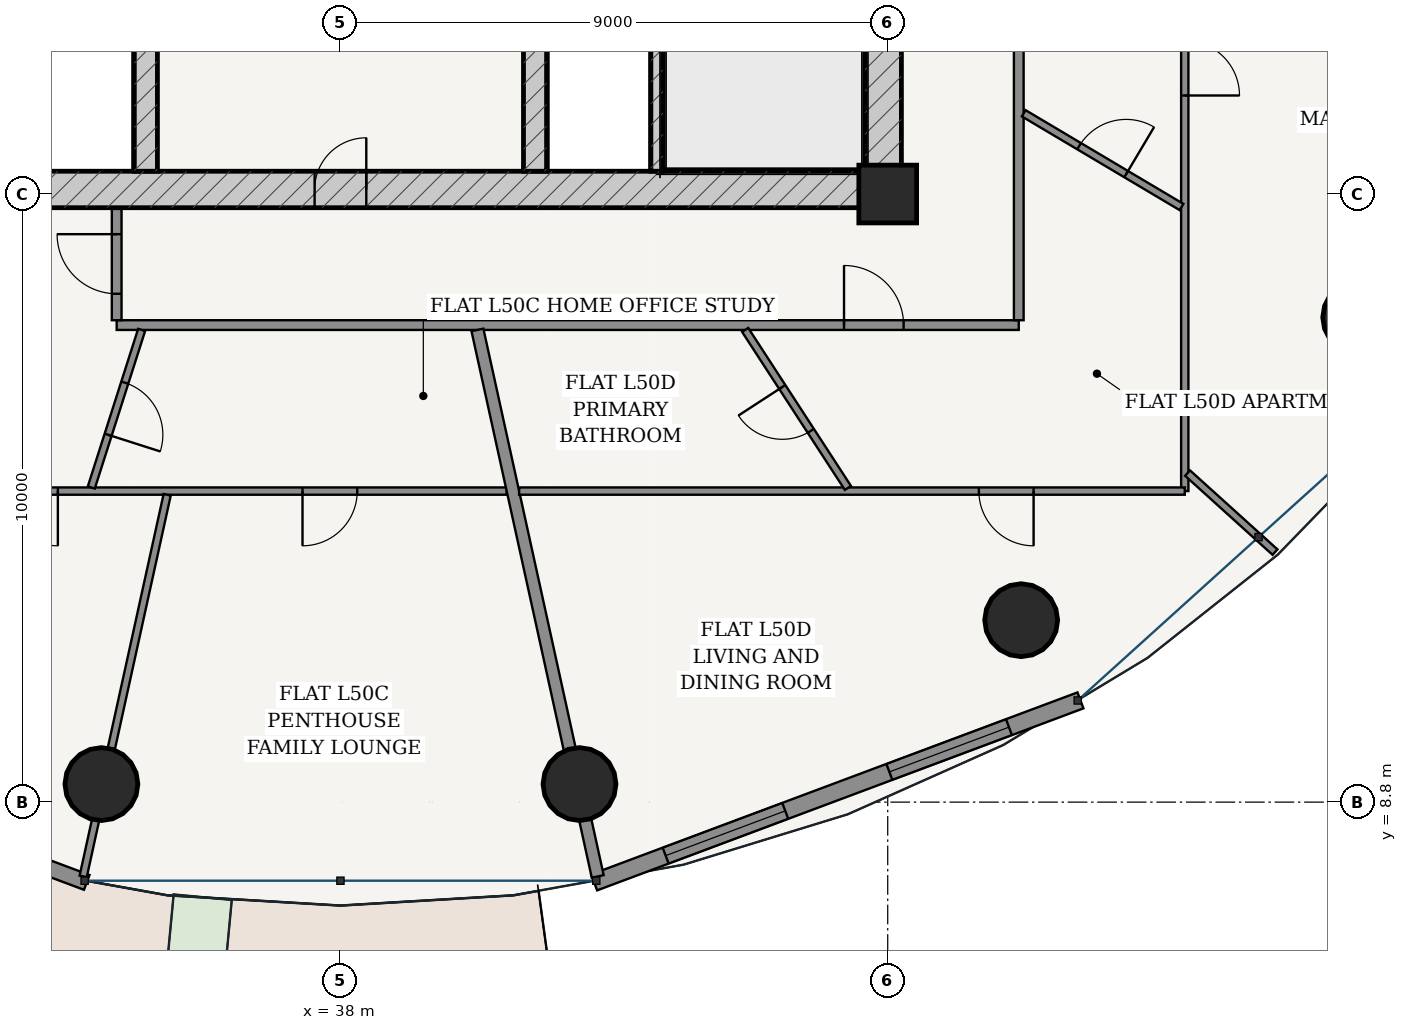
"""IFC4 building model, lengths in metres.
Left out: names, types, materials, properties, quantities, classifications, styles, units other than length and angle.
Written with IfcOpenShell. Run it as: python <this file> out.ifc"""

import sys

from ifc_helpers import new_model, si_unit, direction, frame, frame_2d, origin, origin_2d, place, context, subcontext, project, spatial, rectangle, hollow_circle, extrude, source, transform, mapped, element, fill, save


model = new_model("IFC4")
c1 = context("Model", 3, precision=1e-05, world=origin(), true_north=direction((-0.2419218956, 0.970295726276)))
c2 = subcontext(c1, "Body", "Model", "MODEL_VIEW")
j1 = project(units=[si_unit("LENGTHUNIT", "METRE"), si_unit("PLANEANGLEUNIT", "RADIAN")], contexts=[c1])
p1 = place(None, origin())
s1 = spatial("IfcSite", under=j1, at=p1, CompositionType="ELEMENT")
p2 = place(p1, origin())
s2 = spatial("IfcBuilding", under=s1, at=p2, CompositionType="ELEMENT")
p3 = place(p2, frame((0.0, 0.0, 191.2)))
s3 = spatial("IfcBuildingStorey", under=s2, at=p3, CompositionType="ELEMENT", Elevation=191.2)
p4 = place(p3, frame((47.0, 18.8, 0.0), z_axis=(0.0, 0.0, 1.0), x_axis=(1.0, 0.0, 0.0)))
e1 = element("IfcColumn", 1, at=p4, inside=s3, PredefinedType="COLUMN", context=c2, shape_type="SweptSolid", body=[
    extrude(rectangle(XDim=0.95, YDim=0.95, at=origin_2d()), origin(), (0.0, 0.0, 1.0), 3.7),
])
p5 = place(p3, frame((28.775, 18.875, 0.0), z_axis=(0.0, 0.0, 1.0), x_axis=(1.0, 0.0, 0.0)))
e2 = element("IfcWall", 2, at=p5, inside=s3, PredefinedType="SHEAR", context=c2, shape_type="SweptSolid", body=[
    extrude(rectangle(XDim=18.45, YDim=0.6, at=frame_2d((9.225, 0.0))), origin(), (0.0, 0.0, 1.0), 3.435),
])
p6 = place(p5, frame((8.8, 0.0, 0.0)))
e3 = element("IfcOpeningElement", 3, at=p6, cuts=e2, PredefinedType="OPENING", context=c2, shape_type="SweptSolid", body=[
    extrude(rectangle(XDim=0.85, YDim=2.1, at=frame_2d((0.425, 1.05))), frame((0.0, 0.31, 0.0), z_axis=(0.0, -1.0, 0.0), x_axis=(1.0, 0.0, 0.0)), (0.0, 0.0, 1.0), 0.62),
])
p7 = place(p3, frame((46.925, 19.175, 0.0), z_axis=(0.0, 0.0, 1.0), x_axis=(0.0, 1.0, 0.0)))
e4 = element("IfcWall", 4, at=p7, inside=s3, PredefinedType="SHEAR", context=c2, shape_type="SweptSolid", body=[
    extrude(rectangle(XDim=15.25, YDim=0.6, at=frame_2d((7.625, 0.0))), origin(), (0.0, 0.0, 1.0), 3.435),
])
p8 = place(p7, frame((9.875, 0.0, 0.0)))
e5 = element("IfcOpeningElement", 5, at=p8, cuts=e4, PredefinedType="OPENING", context=c2, shape_type="SweptSolid", body=[
    extrude(rectangle(XDim=1.5, YDim=2.2, at=frame_2d((0.75, 1.1))), frame((0.0, 0.31, 0.0), z_axis=(0.0, -1.0, 0.0), x_axis=(1.0, 0.0, 0.0)), (0.0, 0.0, 1.0), 0.62),
])
p9 = place(p3, frame((43.205, 19.175, 0.0), z_axis=(0.0, 0.0, 1.0), x_axis=(0.0, 1.0, 0.0)))
e6 = element("IfcWall", 6, at=p9, inside=s3, PredefinedType="SOLIDWALL", context=c2, shape_type="SweptSolid", body=[
    extrude(rectangle(XDim=7.375, YDim=0.2, at=frame_2d((3.688, 0.0))), origin(), (0.0, 0.0, 1.0), 3.435),
])
p10 = place(p3, frame((34.8, 19.175, 0.0), z_axis=(0.0, 0.0, 1.0), x_axis=(0.0, 1.0, 0.0)))
e7 = element("IfcWall", 7, at=p10, inside=s3, PredefinedType="SHEAR", context=c2, shape_type="SweptSolid", body=[
    extrude(rectangle(XDim=15.25, YDim=0.38, at=frame_2d((7.625, 0.0))), origin(), (0.0, 0.0, 1.0), 3.435),
])
p11 = place(p10, frame((7.8, 0.0, 0.0)))
e8 = element("IfcOpeningElement", 8, at=p11, cuts=e7, PredefinedType="OPENING", context=c2, shape_type="SweptSolid", body=[
    extrude(rectangle(XDim=1.05, YDim=2.15, at=frame_2d((0.525, 1.075))), frame((0.0, 0.2, 0.0), z_axis=(0.0, -1.0, 0.0), x_axis=(1.0, 0.0, 0.0)), (0.0, 0.0, 1.0), 0.4),
])
p12 = place(p3, frame((41.2, 19.175, 0.0), z_axis=(0.0, 0.0, 1.0), x_axis=(0.0, 1.0, 0.0)))
e9 = element("IfcWall", 9, at=p12, inside=s3, PredefinedType="SHEAR", context=c2, shape_type="SweptSolid", body=[
    extrude(rectangle(XDim=15.25, YDim=0.38, at=frame_2d((7.625, 0.0))), origin(), (0.0, 0.0, 1.0), 3.435),
])
p13 = place(p12, frame((7.8, 0.0, 0.0)))
e10 = element("IfcOpeningElement", 10, at=p13, cuts=e9, PredefinedType="OPENING", context=c2, shape_type="SweptSolid", body=[
    extrude(rectangle(XDim=1.05, YDim=2.15, at=frame_2d((0.525, 1.075))), frame((0.0, 0.2, 0.0), z_axis=(0.0, -1.0, 0.0), x_axis=(1.0, 0.0, 0.0)), (0.0, 0.0, 1.0), 0.4),
])
for number, where, z_axis, x_axis in (
    (11, (34.069, 9.097, 0.0), (0.0, 0.0, 1.0), (1.0, 0.0, 0.0)),
    (12, (41.931, 9.097, 0.0), (0.0, 0.0, 1.0), (1.0, 0.0, 0.0)),
    (13, (49.195, 11.792, 0.0), (0.0, 0.0, 1.0), (1.0, 0.0, 0.0)),
    (14, (54.754, 16.772, 0.0), (0.0, 0.0, 1.0), (1.0, 0.0, 0.0)),
):
    element("IfcColumn", number, at=place(p3, frame(where, z_axis=z_axis, x_axis=x_axis)), inside=s3, PredefinedType="COLUMN", context=c2, shape_type="SweptSolid", body=[
        extrude(hollow_circle(Radius=0.6, WallThickness=0.038, at=origin_2d()), origin(), (0.0, 0.0, 1.0), 3.7),
    ])
p14 = place(p3, frame((25.83, 10.473, 0.0), z_axis=(0.0, 0.0, 1.0), x_axis=(0.936556918375, -0.350515532672, 0.0)))
e15 = element("IfcWall", 15, at=p14, inside=s3, PredefinedType="SOLIDWALL", context=c2, shape_type="SweptSolid", body=[
    extrude(rectangle(XDim=8.539, YDim=0.26, at=frame_2d((4.27, 0.0))), origin(), (0.0, 0.0, 1.0), 3.435),
])
p15 = place(p14, frame((3.594, 0.0, 0.0)))
e16 = element("IfcOpeningElement", 16, at=p15, cuts=e15, PredefinedType="OPENING", context=c2, shape_type="SweptSolid", body=[
    extrude(rectangle(XDim=1.35, YDim=2.2, at=frame_2d((0.675, 1.1))), frame((0.0, 0.14, 0.0), z_axis=(0.0, -1.0, 0.0), x_axis=(1.0, 0.0, 0.0)), (0.0, 0.0, 1.0), 0.28),
])
p16 = place(p3, frame((42.172, 7.48, 0.0), z_axis=(0.0, 0.0, 1.0), x_axis=(0.936556918375, 0.350515532672, 0.0)))
e17 = element("IfcWall", 17, at=p16, inside=s3, PredefinedType="SOLIDWALL", context=c2, shape_type="SweptSolid", body=[
    extrude(rectangle(XDim=8.539, YDim=0.28, at=frame_2d((4.27, 0.0))), origin(), (0.0, 0.0, 1.0), 3.435),
])
p17 = place(p16, frame((1.256, 0.0, 0.85)))
e18 = element("IfcOpeningElement", 18, at=p17, cuts=e17, PredefinedType="OPENING", context=c2, shape_type="SweptSolid", body=[
    extrude(rectangle(XDim=2.1, YDim=1.95, at=frame_2d((1.05, 0.975))), frame((0.0, 0.15, 0.0), z_axis=(0.0, -1.0, 0.0), x_axis=(1.0, 0.0, 0.0)), (0.0, 0.0, 1.0), 0.3),
])
p18 = place(p16, frame((5.184, 0.0, 0.85)))
e19 = element("IfcOpeningElement", 19, at=p18, cuts=e17, PredefinedType="OPENING", context=c2, shape_type="SweptSolid", body=[
    extrude(rectangle(XDim=2.1, YDim=1.95, at=frame_2d((1.05, 0.975))), frame((0.0, 0.15, 0.0), z_axis=(0.0, -1.0, 0.0), x_axis=(1.0, 0.0, 0.0)), (0.0, 0.0, 1.0), 0.3),
])
p19 = place(p3, frame((34.32, 16.645, 0.0), z_axis=(0.0, 0.0, 1.0), x_axis=(1.0, 0.0, 0.0)))
e20 = element("IfcWall", 20, at=p19, inside=s3, PredefinedType="PARTITIONING", context=c2, shape_type="SweptSolid", body=[
    extrude(rectangle(XDim=14.835, YDim=0.16, at=frame_2d((7.417, 0.0))), origin(), (0.0, 0.0, 1.0), 2.951),
])
p20 = place(p19, frame((11.961, 0.0, 0.0)))
e21 = element("IfcOpeningElement", 21, at=p20, cuts=e20, PredefinedType="OPENING", context=c2, shape_type="SweptSolid", body=[
    extrude(rectangle(XDim=0.98, YDim=2.2, at=frame_2d((0.49, 1.1))), frame((0.0, 0.09, 0.0), z_axis=(0.0, -1.0, 0.0), x_axis=(1.0, 0.0, 0.0)), (0.0, 0.0, 1.0), 0.18),
])
p21 = place(p3, frame((34.32, 16.725, 0.0), z_axis=(0.0, 0.0, 1.0), x_axis=(0.0, 1.0, 0.0)))
e22 = element("IfcWall", 22, at=p21, inside=s3, PredefinedType="PARTITIONING", context=c2, shape_type="SweptSolid", body=[
    extrude(rectangle(XDim=1.85, YDim=0.16, at=frame_2d((0.925, 0.0))), origin(), (0.0, 0.0, 1.0), 3.435),
])
p22 = place(p21, frame((0.435, 0.0, 0.0)))
e23 = element("IfcOpeningElement", 23, at=p22, cuts=e22, PredefinedType="OPENING", context=c2, shape_type="SweptSolid", body=[
    extrude(rectangle(XDim=0.98, YDim=2.2, at=frame_2d((0.49, 1.1))), frame((0.0, 0.09, 0.0), z_axis=(0.0, -1.0, 0.0), x_axis=(1.0, 0.0, 0.0)), (0.0, 0.0, 1.0), 0.18),
])
p23 = place(p3, frame((49.155, 16.725, 0.0), z_axis=(0.0, 0.0, 1.0), x_axis=(0.0, 1.0, 0.0)))
e24 = element("IfcWall", 24, at=p23, inside=s3, PredefinedType="PARTITIONING", context=c2, shape_type="SweptSolid", body=[
    extrude(rectangle(XDim=18.3, YDim=0.16, at=frame_2d((9.15, 0.0))), origin(), (0.0, 0.0, 1.0), 2.951),
])
p24 = place(p3, frame((40.734, 13.915, 0.0), z_axis=(0.0, 0.0, 1.0), x_axis=(-1.0, 0.0, 0.0)))
e25 = element("IfcWall", 25, at=p24, inside=s3, PredefinedType="PARTITIONING", context=c2, shape_type="SweptSolid", body=[
    extrude(rectangle(XDim=9.144, YDim=0.12, at=frame_2d((4.572, 0.0))), origin(), (0.0, 0.0, 1.0), 2.951),
])
p25 = place(p24, frame((7.381, 0.0, 0.0)))
e26 = element("IfcOpeningElement", 26, at=p25, cuts=e25, PredefinedType="OPENING", context=c2, shape_type="SweptSolid", body=[
    extrude(rectangle(XDim=0.9, YDim=2.15, at=frame_2d((0.45, 1.075))), frame((0.0, 0.07, 0.0), z_axis=(0.0, -1.0, 0.0), x_axis=(1.0, 0.0, 0.0)), (0.0, 0.0, 1.0), 0.14),
])
p26 = place(p24, frame((2.458, 0.0, 0.0)))
e27 = element("IfcOpeningElement", 27, at=p26, cuts=e25, PredefinedType="OPENING", context=c2, shape_type="SweptSolid", body=[
    extrude(rectangle(XDim=0.9, YDim=2.15, at=frame_2d((0.45, 1.075))), frame((0.0, 0.07, 0.0), z_axis=(0.0, -1.0, 0.0), x_axis=(1.0, 0.0, 0.0)), (0.0, 0.0, 1.0), 0.14),
])
p27 = place(p3, frame((35.15, 13.854, 0.0), z_axis=(0.0, 0.0, 1.0), x_axis=(-0.214942949264, -0.976626606519, 0.0)))
e28 = element("IfcWall", 28, at=p27, inside=s3, PredefinedType="PARTITIONING", context=c2, shape_type="SweptSolid", body=[
    extrude(rectangle(XDim=6.427, YDim=0.12, at=frame_2d((3.213, 0.0))), origin(), (0.0, 0.0, 1.0), 2.951),
])
p28 = place(p3, frame((34.73, 16.565, 0.0), z_axis=(0.0, 0.0, 1.0), x_axis=(-0.304300161081, -0.952576197459, 0.0)))
e29 = element("IfcWall", 29, at=p28, inside=s3, PredefinedType="PARTITIONING", context=c2, shape_type="SweptSolid", body=[
    extrude(rectangle(XDim=2.72, YDim=0.12, at=frame_2d((1.36, 0.0))), origin(), (0.0, 0.0, 1.0), 3.11),
])
p29 = place(p28, frame((0.91, 0.0, 0.0)))
e30 = element("IfcOpeningElement", 30, at=p29, cuts=e29, PredefinedType="OPENING", context=c2, shape_type="SweptSolid", body=[
    extrude(rectangle(XDim=0.9, YDim=2.15, at=frame_2d((0.45, 1.075))), frame((0.0, 0.07, 0.0), z_axis=(0.0, -1.0, 0.0), x_axis=(1.0, 0.0, 0.0)), (0.0, 0.0, 1.0), 0.14),
])
p30 = place(p3, frame((40.253, 16.565, 0.0), z_axis=(0.0, 0.0, 1.0), x_axis=(0.214957946814, -0.976623305631, 0.0)))
e31 = element("IfcWall", 31, at=p30, inside=s3, PredefinedType="PARTITIONING", context=c2, shape_type="SweptSolid", body=[
    extrude(rectangle(XDim=9.202, YDim=0.2, at=frame_2d((4.601, 0.0))), origin(), (0.0, 0.0, 1.0), 2.951),
])
p31 = place(p3, frame((51.885, 29.194, 0.0), z_axis=(0.0, 0.0, 1.0), x_axis=(0.0, -1.0, 0.0)))
e32 = element("IfcWall", 32, at=p31, inside=s3, PredefinedType="PARTITIONING", context=c2, shape_type="SweptSolid", body=[
    extrude(rectangle(XDim=15.279, YDim=0.12, at=frame_2d((7.639, 0.0))), origin(), (0.0, 0.0, 1.0), 2.951),
])
p32 = place(p31, frame((7.873, 0.0, 0.0)))
e33 = element("IfcOpeningElement", 33, at=p32, cuts=e32, PredefinedType="OPENING", context=c2, shape_type="SweptSolid", body=[
    extrude(rectangle(XDim=0.9, YDim=2.15, at=frame_2d((0.45, 1.075))), frame((0.0, 0.07, 0.0), z_axis=(0.0, -1.0, 0.0), x_axis=(1.0, 0.0, 0.0)), (0.0, 0.0, 1.0), 0.14),
])
p33 = place(p3, frame((51.885, 13.915, 0.0), z_axis=(0.0, 0.0, 1.0), x_axis=(-1.0, 0.0, 0.0)))
e34 = element("IfcWall", 34, at=p33, inside=s3, PredefinedType="PARTITIONING", context=c2, shape_type="SweptSolid", body=[
    extrude(rectangle(XDim=10.947, YDim=0.12, at=frame_2d((5.473, 0.0))), origin(), (0.0, 0.0, 1.0), 2.951),
])
p34 = place(p33, frame((2.486, 0.0, 0.0)))
e35 = element("IfcOpeningElement", 35, at=p34, cuts=e34, PredefinedType="OPENING", context=c2, shape_type="SweptSolid", body=[
    extrude(rectangle(XDim=0.9, YDim=2.15, at=frame_2d((0.45, 1.075))), frame((0.0, 0.07, 0.0), z_axis=(0.0, -1.0, 0.0), x_axis=(1.0, 0.0, 0.0)), (0.0, 0.0, 1.0), 0.14),
])
p35 = place(p3, frame((51.931, 14.211, 0.0), z_axis=(0.0, 0.0, 1.0), x_axis=(0.741971265209, -0.670431683026, 0.0)))
e36 = element("IfcWall", 36, at=p35, inside=s3, PredefinedType="PARTITIONING", context=c2, shape_type="SweptSolid", body=[
    extrude(rectangle(XDim=1.938, YDim=0.12, at=frame_2d((0.969, 0.0))), origin(), (0.0, 0.0, 1.0), 2.951),
])
p36 = place(p3, frame((44.656, 16.565, 0.0), z_axis=(0.0, 0.0, 1.0), x_axis=(0.545173870382, -0.838322999239, 0.0)))
e37 = element("IfcWall", 37, at=p36, inside=s3, PredefinedType="PARTITIONING", context=c2, shape_type="SweptSolid", body=[
    extrude(rectangle(XDim=3.099, YDim=0.12, at=frame_2d((1.549, 0.0))), origin(), (0.0, 0.0, 1.0), 3.11),
])
p37 = place(p36, frame((1.119, 0.0, 0.0)))
e38 = element("IfcOpeningElement", 38, at=p37, cuts=e37, PredefinedType="OPENING", context=c2, shape_type="SweptSolid", body=[
    extrude(rectangle(XDim=0.86, YDim=2.15, at=frame_2d((0.43, 1.075))), frame((0.0, 0.07, 0.0), z_axis=(0.0, -1.0, 0.0), x_axis=(1.0, 0.0, 0.0)), (0.0, 0.0, 1.0), 0.14),
])
p38 = place(p3, frame((49.237, 20.128, 0.0), z_axis=(0.0, 0.0, 1.0), x_axis=(0.859818120481, -0.510600430565, 0.0)))
e39 = element("IfcWall", 39, at=p38, inside=s3, PredefinedType="PARTITIONING", context=c2, shape_type="SweptSolid", body=[
    extrude(rectangle(XDim=3.018, YDim=0.12, at=frame_2d((1.509, 0.0))), origin(), (0.0, 0.0, 1.0), 2.951),
])
p39 = place(p38, frame((1.059, 0.0, 0.0)))
e40 = element("IfcOpeningElement", 40, at=p39, cuts=e39, PredefinedType="OPENING", context=c2, shape_type="SweptSolid", body=[
    extrude(rectangle(XDim=0.9, YDim=2.15, at=frame_2d((0.45, 1.075))), frame((0.0, 0.07, 0.0), z_axis=(0.0, -1.0, 0.0), x_axis=(1.0, 0.0, 0.0)), (0.0, 0.0, 1.0), 0.14),
])
m1 = source(origin(), c2, "Body", "SweptSolid", [
    extrude(rectangle(XDim=2.1, YDim=1.95, at=frame_2d((1.05, 0.975))), frame((0.0, 0.03, 0.0), z_axis=(0.0, -1.0, 0.0), x_axis=(1.0, 0.0, 0.0)), (0.0, 0.0, 1.0), 0.06),
])
p40 = place(p17, origin())
e41 = element("IfcWindow", 41, at=p40, inside=s3, PartitioningType="SINGLE_PANEL", PredefinedType="WINDOW", context=c2, shape_type="MappedRepresentation", body=[
    mapped(m1, transform((0.0, 0.0, 0.0), scale=1.0)),
])
fill(e18, e41)
p41 = place(p18, origin())
e42 = element("IfcWindow", 42, at=p41, inside=s3, PartitioningType="SINGLE_PANEL", PredefinedType="WINDOW", context=c2, shape_type="MappedRepresentation", body=[
    mapped(m1, transform((0.0, 0.0, 0.0), scale=1.0)),
])
fill(e19, e42)
m2 = source(origin(), c2, "Body", "SweptSolid", [
    extrude(rectangle(XDim=0.85, YDim=2.1, at=frame_2d((0.425, 1.05))), frame((0.0, 0.025, 0.0), z_axis=(0.0, -1.0, 0.0), x_axis=(1.0, 0.0, 0.0)), (0.0, 0.0, 1.0), 0.05),
])
p42 = place(p6, origin())
e43 = element("IfcDoor", 43, at=p42, inside=s3, OperationType="SINGLE_SWING_RIGHT", PredefinedType="DOOR", context=c2, shape_type="MappedRepresentation", body=[
    mapped(m2, transform((0.0, 0.0, 0.0), scale=1.0)),
])
fill(e3, e43)
m3 = source(origin(), c2, "Body", "SweptSolid", [
    extrude(rectangle(XDim=0.98, YDim=2.2, at=frame_2d((0.49, 1.1))), frame((0.0, 0.025, 0.0), z_axis=(0.0, -1.0, 0.0), x_axis=(1.0, 0.0, 0.0)), (0.0, 0.0, 1.0), 0.05),
])
p43 = place(p22, origin())
e44 = element("IfcDoor", 44, at=p43, inside=s3, OperationType="SINGLE_SWING_RIGHT", PredefinedType="DOOR", context=c2, shape_type="MappedRepresentation", body=[
    mapped(m3, transform((0.0, 0.0, 0.0), scale=1.0)),
])
fill(e23, e44)
m4 = source(origin(), c2, "Body", "SweptSolid", [
    extrude(rectangle(XDim=0.9, YDim=2.15, at=frame_2d((0.45, 1.075))), frame((0.0, 0.025, 0.0), z_axis=(0.0, -1.0, 0.0), x_axis=(1.0, 0.0, 0.0)), (0.0, 0.0, 1.0), 0.05),
])
p44 = place(p29, origin())
e45 = element("IfcDoor", 45, at=p44, inside=s3, OperationType="SINGLE_SWING_RIGHT", PredefinedType="DOOR", context=c2, shape_type="MappedRepresentation", body=[
    mapped(m4, transform((0.0, 0.0, 0.0), scale=1.0)),
])
fill(e30, e45)
p45 = place(p25, origin())
e46 = element("IfcDoor", 46, at=p45, inside=s3, OperationType="SINGLE_SWING_LEFT", PredefinedType="DOOR", context=c2, shape_type="MappedRepresentation", body=[
    mapped(m4, transform((0.0, 0.0, 0.0), scale=1.0)),
])
fill(e26, e46)
p46 = place(p26, origin())
e47 = element("IfcDoor", 47, at=p46, inside=s3, OperationType="SINGLE_SWING_RIGHT", PredefinedType="DOOR", context=c2, shape_type="MappedRepresentation", body=[
    mapped(m4, transform((0.0, 0.0, 0.0), scale=1.0)),
])
fill(e27, e47)
p47 = place(p20, origin())
e48 = element("IfcDoor", 48, at=p47, inside=s3, OperationType="SINGLE_SWING_LEFT", PredefinedType="DOOR", context=c2, shape_type="MappedRepresentation", body=[
    mapped(m3, transform((0.0, 0.0, 0.0), scale=1.0)),
])
fill(e21, e48)
m5 = source(origin(), c2, "Body", "SweptSolid", [
    extrude(rectangle(XDim=0.86, YDim=2.15, at=frame_2d((0.43, 1.075))), frame((0.0, 0.025, 0.0), z_axis=(0.0, -1.0, 0.0), x_axis=(1.0, 0.0, 0.0)), (0.0, 0.0, 1.0), 0.05),
])
p48 = place(p37, frame((0.86, 0.0, 0.0), z_axis=(0.0, 0.0, 1.0), x_axis=(-1.0, 0.0, 0.0)))
e49 = element("IfcDoor", 49, at=p48, inside=s3, OperationType="SINGLE_SWING_RIGHT", PredefinedType="DOOR", context=c2, shape_type="MappedRepresentation", body=[
    mapped(m5, transform((0.0, 0.0, 0.0), scale=1.0)),
])
fill(e38, e49)
p49 = place(p34, origin())
e50 = element("IfcDoor", 50, at=p49, inside=s3, OperationType="SINGLE_SWING_LEFT", PredefinedType="DOOR", context=c2, shape_type="MappedRepresentation", body=[
    mapped(m4, transform((0.0, 0.0, 0.0), scale=1.0)),
])
fill(e35, e50)
p50 = place(p39, origin())
e51 = element("IfcDoor", 51, at=p50, inside=s3, OperationType="SINGLE_SWING_RIGHT", PredefinedType="DOOR", context=c2, shape_type="MappedRepresentation", body=[
    mapped(m4, transform((0.0, 0.0, 0.0), scale=1.0)),
])
fill(e40, e51)
p51 = place(p32, origin())
e52 = element("IfcDoor", 52, at=p51, inside=s3, OperationType="SINGLE_SWING_RIGHT", PredefinedType="DOOR", context=c2, shape_type="MappedRepresentation", body=[
    mapped(m4, transform((0.0, 0.0, 0.0), scale=1.0)),
])
fill(e33, e52)
save(model, sys.argv[1])
